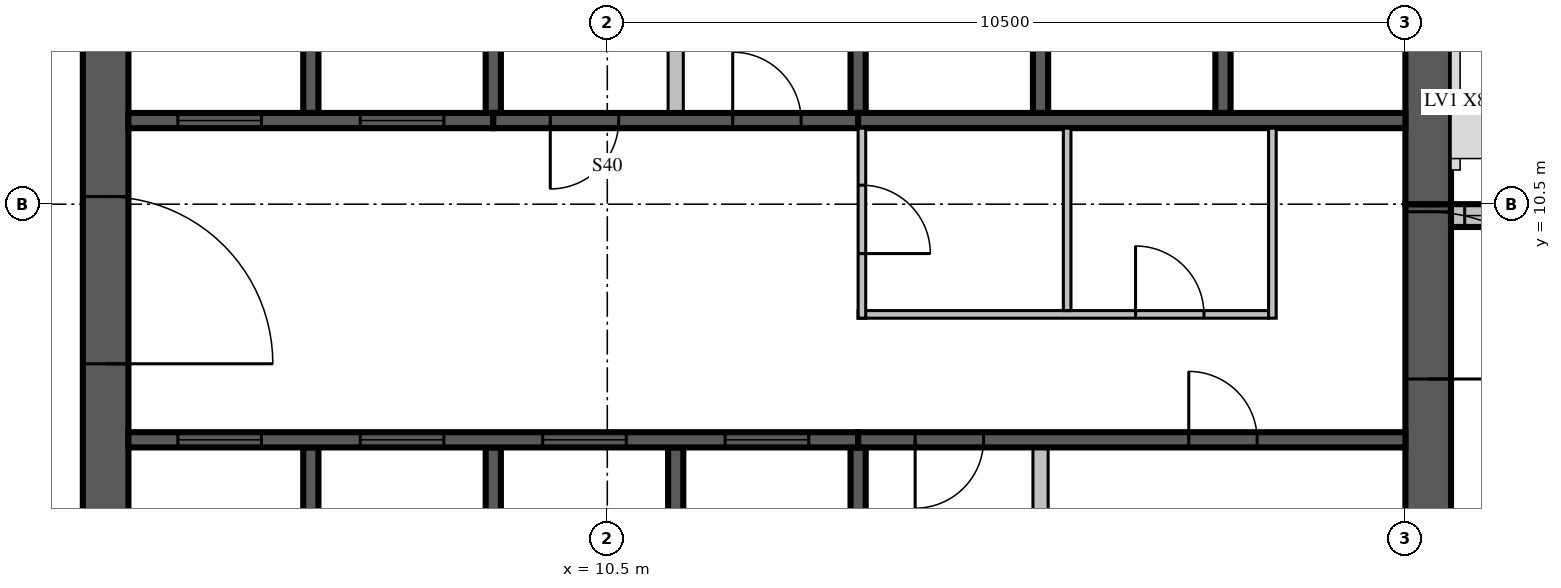
"""IFC4 building model, lengths in metres.
Left out: names, types, materials, properties, quantities, classifications, styles, units other than length and angle.
Written with IfcOpenShell. Run it as: python <this file> out.ifc"""

import sys

from ifc_helpers import new_model, si_unit, direction, frame, frame_2d, origin, place, context, subcontext, project, spatial, rectangle, extrude, source, transform, mapped, element, fill, save


model = new_model("IFC4")
c1 = context("Model", 3, precision=1e-05, world=origin(), true_north=direction((0.0, 1.0)))
c2 = subcontext(c1, "Body", "Model", "MODEL_VIEW")
j1 = project(units=[si_unit("LENGTHUNIT", "METRE"), si_unit("PLANEANGLEUNIT", "RADIAN")], contexts=[c1])
p1 = place(None, origin())
s1 = spatial("IfcSite", under=j1, at=p1, CompositionType="ELEMENT")
p2 = place(p1, origin())
s2 = spatial("IfcBuilding", under=s1, at=p2, CompositionType="ELEMENT")
p3 = place(p2, frame((0.0, 0.0, 319.5)))
s3 = spatial("IfcBuildingStorey", under=s2, at=p3, CompositionType="ELEMENT", Elevation=319.5)
m1 = source(origin(), c2, "Body", "SweptSolid", [
    extrude(rectangle(XDim=17.4, YDim=0.6, at=frame_2d((8.7, 0.0))), origin(), (0.0, 0.0, 1.0), 3.5),
])
p4 = place(p3, frame((3.9, 4.2, 0.0), z_axis=(0.0, 0.0, 1.0), x_axis=(0.0, 1.0, 0.0)))
e1 = element("IfcWall", 1, at=p4, inside=s3, PredefinedType="SHEAR", context=c2, shape_type="MappedRepresentation", body=[
    mapped(m1, transform((0.0, 0.0, 0.0), scale=1.0)),
])
m2 = source(origin(), c2, "Body", "SweptSolid", [
    extrude(rectangle(XDim=2.2, YDim=2.1, at=frame_2d((1.1, 1.05))), frame((0.0, 0.31, 0.0), z_axis=(0.0, -1.0, 0.0), x_axis=(1.0, 0.0, 0.0)), (0.0, 0.0, 1.0), 0.62),
])
p5 = place(p4, frame((4.2, 0.0, 0.0)))
e2 = element("IfcOpeningElement", 2, at=p5, cuts=e1, PredefinedType="OPENING", context=c2, shape_type="MappedRepresentation", body=[
    mapped(m2, transform((0.0, 0.0, 0.0), scale=1.0)),
])
m3 = source(origin(), c2, "Body", "SweptSolid", [
    extrude(rectangle(XDim=6.3, YDim=0.6, at=frame_2d((3.15, 0.0))), origin(), (0.0, 0.0, 1.0), 3.5),
])
p6 = place(p3, frame((21.3, 4.2, 0.0), z_axis=(0.0, 0.0, 1.0), x_axis=(0.0, 1.0, 0.0)))
e3 = element("IfcWall", 3, at=p6, inside=s3, PredefinedType="SHEAR", context=c2, shape_type="MappedRepresentation", body=[
    mapped(m3, transform((0.0, 0.0, 0.0), scale=1.0)),
])
p7 = place(p6, frame((4.0, 0.0, 0.0)))
e4 = element("IfcOpeningElement", 4, at=p7, cuts=e3, PredefinedType="OPENING", context=c2, shape_type="MappedRepresentation", body=[
    mapped(m2, transform((0.0, 0.0, 0.0), scale=1.0)),
])
m4 = source(origin(), c2, "Body", "SweptSolid", [
    extrude(rectangle(XDim=10.5, YDim=0.6, at=frame_2d((5.25, 0.0))), origin(), (0.0, 0.0, 1.0), 3.5),
])
p8 = place(p3, frame((21.3, 10.5, 0.0), z_axis=(0.0, 0.0, 1.0), x_axis=(0.0, 1.0, 0.0)))
e5 = element("IfcWall", 5, at=p8, inside=s3, PredefinedType="SHEAR", context=c2, shape_type="MappedRepresentation", body=[
    mapped(m4, transform((0.0, 0.0, 0.0), scale=1.0)),
])
m5 = source(origin(), c2, "Body", "SweptSolid", [
    extrude(rectangle(XDim=1.2, YDim=2.4, at=frame_2d((0.6, 1.2))), frame((0.0, 0.31, 0.0), z_axis=(0.0, -1.0, 0.0), x_axis=(1.0, 0.0, 0.0)), (0.0, 0.0, 1.0), 0.62),
])
p9 = place(p8, frame((5.7, 0.0, 0.6)))
e6 = element("IfcOpeningElement", 6, at=p9, cuts=e5, PredefinedType="OPENING", context=c2, shape_type="MappedRepresentation", body=[
    mapped(m5, transform((0.0, 0.0, 0.0), scale=1.0)),
])
m6 = source(origin(), c2, "Body", "SweptSolid", [
    extrude(rectangle(XDim=7.45, YDim=0.3, at=frame_2d((3.725, 0.0))), origin(), (0.0, 0.0, 1.0), 3.1),
])
p10 = place(p3, frame((29.05, 10.35, 0.0), z_axis=(0.0, 0.0, 1.0), x_axis=(-1.0, 0.0, 0.0)))
e7 = element("IfcWall", 7, at=p10, inside=s3, PredefinedType="STANDARD", context=c2, shape_type="MappedRepresentation", body=[
    mapped(m6, transform((0.0, 0.0, 0.0), scale=1.0)),
])
m7 = source(origin(), c2, "Body", "SweptSolid", [
    extrude(rectangle(XDim=3.0, YDim=2.0, at=frame_2d((1.5, 1.0))), frame((0.0, 0.16, 0.0), z_axis=(0.0, -1.0, 0.0), x_axis=(1.0, 0.0, 0.0)), (0.0, 0.0, 1.0), 0.32),
])
p11 = place(p10, frame((1.09, 0.0, 0.6)))
e8 = element("IfcOpeningElement", 8, at=p11, cuts=e7, PredefinedType="OPENING", context=c2, shape_type="MappedRepresentation", body=[
    mapped(m7, transform((0.0, 0.0, 0.0), scale=1.0)),
])
m8 = source(origin(), c2, "Body", "SweptSolid", [
    extrude(rectangle(XDim=1.8, YDim=2.0, at=frame_2d((0.9, 1.0))), frame((0.0, 0.16, 0.0), z_axis=(0.0, -1.0, 0.0), x_axis=(1.0, 0.0, 0.0)), (0.0, 0.0, 1.0), 0.32),
])
p12 = place(p10, frame((5.47, 0.0, 0.6)))
e9 = element("IfcOpeningElement", 9, at=p12, cuts=e7, PredefinedType="OPENING", context=c2, shape_type="MappedRepresentation", body=[
    mapped(m8, transform((0.0, 0.0, 0.0), scale=1.0)),
])
m9 = source(origin(), c2, "Body", "SweptSolid", [
    extrude(rectangle(XDim=3.1, YDim=0.2, at=frame_2d((1.55, 0.0))), origin(), (0.0, 0.0, 1.0), 3.5),
])
for number, where, z_axis, x_axis in (
    (10, (6.6, 4.2, 0.0), (0.0, 0.0, 1.0), (0.0, 1.0, 0.0)),
    (11, (9.0, 4.2, 0.0), (0.0, 0.0, 1.0), (0.0, 1.0, 0.0)),
    (12, (11.4, 4.2, 0.0), (0.0, 0.0, 1.0), (0.0, 1.0, 0.0)),
):
    element("IfcWall", number, at=place(p3, frame(where, z_axis=z_axis, x_axis=x_axis)), inside=s3, PredefinedType="SOLIDWALL", context=c2, shape_type="MappedRepresentation", body=[
        mapped(m9, transform((0.0, 0.0, 0.0), scale=1.0)),
    ])
m10 = source(origin(), c2, "Body", "SweptSolid", [
    extrude(rectangle(XDim=3.1, YDim=0.2, at=frame_2d((1.55, 0.0))), origin(), (0.0, 0.0, 1.0), 3.1),
])
p13 = place(p3, frame((13.8, 4.2, 0.0), z_axis=(0.0, 0.0, 1.0), x_axis=(0.0, 1.0, 0.0)))
e13 = element("IfcWall", 13, at=p13, inside=s3, PredefinedType="SOLIDWALL", context=c2, shape_type="MappedRepresentation", body=[
    mapped(m10, transform((0.0, 0.0, 0.0), scale=1.0)),
])
m11 = source(origin(), c2, "Body", "SweptSolid", [
    extrude(rectangle(XDim=3.1, YDim=0.2, at=frame_2d((1.55, 0.0))), origin(), (0.0, 0.0, 1.0), 3.1),
])
p14 = place(p3, frame((16.2, 4.2, 0.0), z_axis=(0.0, 0.0, 1.0), x_axis=(0.0, 1.0, 0.0)))
e14 = element("IfcWall", 14, at=p14, inside=s3, PredefinedType="PARTITIONING", context=c2, shape_type="MappedRepresentation", body=[
    mapped(m11, transform((0.0, 0.0, 0.0), scale=1.0)),
])
m12 = source(origin(), c2, "Body", "SweptSolid", [
    extrude(rectangle(XDim=3.0, YDim=0.2, at=frame_2d((1.5, 0.0))), origin(), (0.0, 0.0, 1.0), 3.5),
])
p15 = place(p3, frame((6.6, 11.7, 0.0), z_axis=(0.0, 0.0, 1.0), x_axis=(0.0, 1.0, 0.0)))
e15 = element("IfcWall", 15, at=p15, inside=s3, PredefinedType="SOLIDWALL", context=c2, shape_type="MappedRepresentation", body=[
    mapped(m12, transform((0.0, 0.0, 0.0), scale=1.0)),
])
m13 = source(origin(), c2, "Body", "SweptSolid", [
    extrude(rectangle(XDim=3.0, YDim=0.2, at=frame_2d((1.5, 0.0))), origin(), (0.0, 0.0, 1.0), 3.1),
])
for number, where, z_axis, x_axis in (
    (16, (9.0, 11.7, 0.0), (0.0, 0.0, 1.0), (0.0, 1.0, 0.0)),
    (17, (13.8, 11.7, 0.0), (0.0, 0.0, 1.0), (0.0, 1.0, 0.0)),
):
    element("IfcWall", number, at=place(p3, frame(where, z_axis=z_axis, x_axis=x_axis)), inside=s3, PredefinedType="SOLIDWALL", context=c2, shape_type="MappedRepresentation", body=[
        mapped(m13, transform((0.0, 0.0, 0.0), scale=1.0)),
    ])
for number, where, z_axis, x_axis in (
    (18, (16.2, 11.7, 0.0), (0.0, 0.0, 1.0), (0.0, 1.0, 0.0)),
    (19, (18.6, 11.7, 0.0), (0.0, 0.0, 1.0), (0.0, 1.0, 0.0)),
):
    element("IfcWall", number, at=place(p3, frame(where, z_axis=z_axis, x_axis=x_axis)), inside=s3, PredefinedType="SOLIDWALL", context=c2, shape_type="MappedRepresentation", body=[
        mapped(m12, transform((0.0, 0.0, 0.0), scale=1.0)),
    ])
m14 = source(origin(), c2, "Body", "SweptSolid", [
    extrude(rectangle(XDim=3.0, YDim=0.2, at=frame_2d((1.5, 0.0))), origin(), (0.0, 0.0, 1.0), 3.1),
])
p16 = place(p3, frame((11.4, 11.7, 0.0), z_axis=(0.0, 0.0, 1.0), x_axis=(0.0, 1.0, 0.0)))
e20 = element("IfcWall", 20, at=p16, inside=s3, PredefinedType="PARTITIONING", context=c2, shape_type="MappedRepresentation", body=[
    mapped(m14, transform((0.0, 0.0, 0.0), scale=1.0)),
])
m15 = source(origin(), c2, "Body", "SweptSolid", [
    extrude(rectangle(XDim=9.6, YDim=0.2, at=frame_2d((4.8, 0.0))), origin(), (0.0, 0.0, 1.0), 3.5),
])
p17 = place(p3, frame((4.2, 7.4, 0.0), z_axis=(0.0, 0.0, 1.0), x_axis=(1.0, 0.0, 0.0)))
e21 = element("IfcWall", 21, at=p17, inside=s3, PredefinedType="SOLIDWALL", context=c2, shape_type="MappedRepresentation", body=[
    mapped(m15, transform((0.0, 0.0, 0.0), scale=1.0)),
])
m16 = source(origin(), c2, "Body", "SweptSolid", [
    extrude(rectangle(XDim=1.1, YDim=2.1, at=frame_2d((0.55, 1.05))), frame((0.0, 0.11, 0.0), z_axis=(0.0, -1.0, 0.0), x_axis=(1.0, 0.0, 0.0)), (0.0, 0.0, 1.0), 0.22),
])
p18 = place(p17, frame((0.65, 0.0, 0.0)))
e22 = element("IfcOpeningElement", 22, at=p18, cuts=e21, PredefinedType="OPENING", context=c2, shape_type="MappedRepresentation", body=[
    mapped(m16, transform((0.0, 0.0, 0.0), scale=1.0)),
])
p19 = place(p17, frame((3.05, 0.0, 0.0)))
e23 = element("IfcOpeningElement", 23, at=p19, cuts=e21, PredefinedType="OPENING", context=c2, shape_type="MappedRepresentation", body=[
    mapped(m16, transform((0.0, 0.0, 0.0), scale=1.0)),
])
p20 = place(p17, frame((5.45, 0.0, 0.0)))
e24 = element("IfcOpeningElement", 24, at=p20, cuts=e21, PredefinedType="OPENING", context=c2, shape_type="MappedRepresentation", body=[
    mapped(m16, transform((0.0, 0.0, 0.0), scale=1.0)),
])
p21 = place(p17, frame((7.85, 0.0, 0.0)))
e25 = element("IfcOpeningElement", 25, at=p21, cuts=e21, PredefinedType="OPENING", context=c2, shape_type="MappedRepresentation", body=[
    mapped(m16, transform((0.0, 0.0, 0.0), scale=1.0)),
])
m17 = source(origin(), c2, "Body", "SweptSolid", [
    extrude(rectangle(XDim=7.2, YDim=0.2, at=frame_2d((3.6, 0.0))), origin(), (0.0, 0.0, 1.0), 3.1),
])
p22 = place(p3, frame((13.8, 7.4, 0.0), z_axis=(0.0, 0.0, 1.0), x_axis=(1.0, 0.0, 0.0)))
e26 = element("IfcWall", 26, at=p22, inside=s3, PredefinedType="SOLIDWALL", context=c2, shape_type="MappedRepresentation", body=[
    mapped(m17, transform((0.0, 0.0, 0.0), scale=1.0)),
])
m18 = source(origin(), c2, "Body", "SweptSolid", [
    extrude(rectangle(XDim=0.9, YDim=2.1, at=frame_2d((0.45, 1.05))), frame((0.0, 0.11, 0.0), z_axis=(0.0, -1.0, 0.0), x_axis=(1.0, 0.0, 0.0)), (0.0, 0.0, 1.0), 0.22),
])
p23 = place(p22, frame((0.75, 0.0, 0.0)))
e27 = element("IfcOpeningElement", 27, at=p23, cuts=e26, PredefinedType="OPENING", context=c2, shape_type="MappedRepresentation", body=[
    mapped(m18, transform((0.0, 0.0, 0.0), scale=1.0)),
])
p24 = place(p22, frame((4.35, 0.0, 0.0)))
e28 = element("IfcOpeningElement", 28, at=p24, cuts=e26, PredefinedType="OPENING", context=c2, shape_type="MappedRepresentation", body=[
    mapped(m18, transform((0.0, 0.0, 0.0), scale=1.0)),
])
m19 = source(origin(), c2, "Body", "SweptSolid", [
    extrude(rectangle(XDim=4.8, YDim=0.2, at=frame_2d((2.4, 0.0))), origin(), (0.0, 0.0, 1.0), 3.5),
])
p25 = place(p3, frame((4.2, 11.6, 0.0), z_axis=(0.0, 0.0, 1.0), x_axis=(1.0, 0.0, 0.0)))
e29 = element("IfcWall", 29, at=p25, inside=s3, PredefinedType="SOLIDWALL", context=c2, shape_type="MappedRepresentation", body=[
    mapped(m19, transform((0.0, 0.0, 0.0), scale=1.0)),
])
p26 = place(p25, frame((0.65, 0.0, 0.0)))
e30 = element("IfcOpeningElement", 30, at=p26, cuts=e29, PredefinedType="OPENING", context=c2, shape_type="MappedRepresentation", body=[
    mapped(m16, transform((0.0, 0.0, 0.0), scale=1.0)),
])
p27 = place(p25, frame((3.05, 0.0, 0.0)))
e31 = element("IfcOpeningElement", 31, at=p27, cuts=e29, PredefinedType="OPENING", context=c2, shape_type="MappedRepresentation", body=[
    mapped(m16, transform((0.0, 0.0, 0.0), scale=1.0)),
])
m20 = source(origin(), c2, "Body", "SweptSolid", [
    extrude(rectangle(XDim=4.8, YDim=0.2, at=frame_2d((2.4, 0.0))), origin(), (0.0, 0.0, 1.0), 3.1),
])
p28 = place(p3, frame((9.0, 11.6, 0.0), z_axis=(0.0, 0.0, 1.0), x_axis=(1.0, 0.0, 0.0)))
e32 = element("IfcWall", 32, at=p28, inside=s3, PredefinedType="SOLIDWALL", context=c2, shape_type="MappedRepresentation", body=[
    mapped(m20, transform((0.0, 0.0, 0.0), scale=1.0)),
])
p29 = place(p28, frame((0.75, 0.0, 0.0)))
e33 = element("IfcOpeningElement", 33, at=p29, cuts=e32, PredefinedType="OPENING", context=c2, shape_type="MappedRepresentation", body=[
    mapped(m18, transform((0.0, 0.0, 0.0), scale=1.0)),
])
p30 = place(p28, frame((3.15, 0.0, 0.0)))
e34 = element("IfcOpeningElement", 34, at=p30, cuts=e32, PredefinedType="OPENING", context=c2, shape_type="MappedRepresentation", body=[
    mapped(m18, transform((0.0, 0.0, 0.0), scale=1.0)),
])
m21 = source(origin(), c2, "Body", "SweptSolid", [
    extrude(rectangle(XDim=7.2, YDim=0.2, at=frame_2d((3.6, 0.0))), origin(), (0.0, 0.0, 1.0), 3.5),
])
p31 = place(p3, frame((13.8, 11.6, 0.0), z_axis=(0.0, 0.0, 1.0), x_axis=(1.0, 0.0, 0.0)))
e35 = element("IfcWall", 35, at=p31, inside=s3, PredefinedType="SOLIDWALL", context=c2, shape_type="MappedRepresentation", body=[
    mapped(m21, transform((0.0, 0.0, 0.0), scale=1.0)),
])
m22 = source(origin(), c2, "Body", "SweptSolid", [
    extrude(rectangle(XDim=5.4, YDim=0.1, at=frame_2d((2.7, 0.0))), origin(), (0.0, 0.0, 1.0), 3.1),
])
p32 = place(p3, frame((13.8, 9.05, 0.0), z_axis=(0.0, 0.0, 1.0), x_axis=(1.0, 0.0, 0.0)))
e36 = element("IfcWall", 36, at=p32, inside=s3, PredefinedType="PARTITIONING", context=c2, shape_type="MappedRepresentation", body=[
    mapped(m22, transform((0.0, 0.0, 0.0), scale=1.0)),
])
m23 = source(origin(), c2, "Body", "SweptSolid", [
    extrude(rectangle(XDim=0.9, YDim=2.1, at=frame_2d((0.45, 1.05))), frame((0.0, 0.06, 0.0), z_axis=(0.0, -1.0, 0.0), x_axis=(1.0, 0.0, 0.0)), (0.0, 0.0, 1.0), 0.12),
])
p33 = place(p32, frame((3.65, 0.0, 0.0)))
e37 = element("IfcOpeningElement", 37, at=p33, cuts=e36, PredefinedType="OPENING", context=c2, shape_type="MappedRepresentation", body=[
    mapped(m23, transform((0.0, 0.0, 0.0), scale=1.0)),
])
m24 = source(origin(), c2, "Body", "SweptSolid", [
    extrude(rectangle(XDim=2.5, YDim=0.1, at=frame_2d((1.25, 0.0))), origin(), (0.0, 0.0, 1.0), 3.1),
])
p34 = place(p3, frame((13.85, 9.0, 0.0), z_axis=(0.0, 0.0, 1.0), x_axis=(0.0, 1.0, 0.0)))
e38 = element("IfcWall", 38, at=p34, inside=s3, PredefinedType="PARTITIONING", context=c2, shape_type="MappedRepresentation", body=[
    mapped(m24, transform((0.0, 0.0, 0.0), scale=1.0)),
])
p35 = place(p34, frame((0.85, 0.0, 0.0)))
e39 = element("IfcOpeningElement", 39, at=p35, cuts=e38, PredefinedType="OPENING", context=c2, shape_type="MappedRepresentation", body=[
    mapped(m23, transform((0.0, 0.0, 0.0), scale=1.0)),
])
m25 = source(origin(), c2, "Body", "SweptSolid", [
    extrude(rectangle(XDim=2.4, YDim=0.1, at=frame_2d((1.2, 0.0))), origin(), (0.0, 0.0, 1.0), 3.1),
])
p36 = place(p3, frame((16.55, 9.1, 0.0), z_axis=(0.0, 0.0, 1.0), x_axis=(0.0, 1.0, 0.0)))
e40 = element("IfcWall", 40, at=p36, inside=s3, PredefinedType="PARTITIONING", context=c2, shape_type="MappedRepresentation", body=[
    mapped(m25, transform((0.0, 0.0, 0.0), scale=1.0)),
])
p37 = place(p3, frame((19.25, 9.0, 0.0), z_axis=(0.0, 0.0, 1.0), x_axis=(0.0, 1.0, 0.0)))
e41 = element("IfcWall", 41, at=p37, inside=s3, PredefinedType="PARTITIONING", context=c2, shape_type="MappedRepresentation", body=[
    mapped(m24, transform((0.0, 0.0, 0.0), scale=1.0)),
])
m26 = source(origin(), c2, "Body", "SweptSolid", [
    extrude(rectangle(XDim=1.8, YDim=2.0, at=frame_2d((0.9, 1.0))), frame((0.0, 0.03, 0.0), z_axis=(0.0, -1.0, 0.0), x_axis=(1.0, 0.0, 0.0)), (0.0, 0.0, 1.0), 0.06),
])
p38 = place(p12, origin())
e42 = element("IfcWindow", 42, at=p38, inside=s3, PartitioningType="SINGLE_PANEL", PredefinedType="WINDOW", context=c2, shape_type="MappedRepresentation", body=[
    mapped(m26, transform((0.0, 0.0, 0.0), scale=1.0)),
])
fill(e9, e42)
m27 = source(origin(), c2, "Body", "SweptSolid", [
    extrude(rectangle(XDim=1.1, YDim=2.1, at=frame_2d((0.55, 1.05))), frame((0.0, 0.025, 0.0), z_axis=(0.0, -1.0, 0.0), x_axis=(1.0, 0.0, 0.0)), (0.0, 0.0, 1.0), 0.05),
])
p39 = place(p18, origin())
e43 = element("IfcDoor", 43, at=p39, inside=s3, OperationType="SLIDING_TO_LEFT", PredefinedType="DOOR", context=c2, shape_type="MappedRepresentation", body=[
    mapped(m27, transform((0.0, 0.0, 0.0), scale=1.0)),
])
fill(e22, e43)
p40 = place(p19, origin())
e44 = element("IfcDoor", 44, at=p40, inside=s3, OperationType="SLIDING_TO_LEFT", PredefinedType="DOOR", context=c2, shape_type="MappedRepresentation", body=[
    mapped(m27, transform((0.0, 0.0, 0.0), scale=1.0)),
])
fill(e23, e44)
p41 = place(p20, origin())
e45 = element("IfcDoor", 45, at=p41, inside=s3, OperationType="SLIDING_TO_LEFT", PredefinedType="DOOR", context=c2, shape_type="MappedRepresentation", body=[
    mapped(m27, transform((0.0, 0.0, 0.0), scale=1.0)),
])
fill(e24, e45)
p42 = place(p21, origin())
e46 = element("IfcDoor", 46, at=p42, inside=s3, OperationType="SLIDING_TO_LEFT", PredefinedType="DOOR", context=c2, shape_type="MappedRepresentation", body=[
    mapped(m27, transform((0.0, 0.0, 0.0), scale=1.0)),
])
fill(e25, e46)
m28 = source(origin(), c2, "Body", "SweptSolid", [
    extrude(rectangle(XDim=0.9, YDim=2.1, at=frame_2d((0.45, 1.05))), frame((0.0, 0.025, 0.0), z_axis=(0.0, -1.0, 0.0), x_axis=(1.0, 0.0, 0.0)), (0.0, 0.0, 1.0), 0.05),
])
p43 = place(p23, origin())
e47 = element("IfcDoor", 47, at=p43, inside=s3, OperationType="SINGLE_SWING_RIGHT", PredefinedType="DOOR", context=c2, shape_type="MappedRepresentation", body=[
    mapped(m28, transform((0.0, 0.0, 0.0), scale=1.0)),
])
fill(e27, e47)
p44 = place(p24, origin())
e48 = element("IfcDoor", 48, at=p44, inside=s3, OperationType="SINGLE_SWING_LEFT", PredefinedType="DOOR", context=c2, shape_type="MappedRepresentation", body=[
    mapped(m28, transform((0.0, 0.0, 0.0), scale=1.0)),
])
fill(e28, e48)
p45 = place(p26, origin())
e49 = element("IfcDoor", 49, at=p45, inside=s3, OperationType="SLIDING_TO_LEFT", PredefinedType="DOOR", context=c2, shape_type="MappedRepresentation", body=[
    mapped(m27, transform((0.0, 0.0, 0.0), scale=1.0)),
])
fill(e30, e49)
p46 = place(p27, origin())
e50 = element("IfcDoor", 50, at=p46, inside=s3, OperationType="SLIDING_TO_LEFT", PredefinedType="DOOR", context=c2, shape_type="MappedRepresentation", body=[
    mapped(m27, transform((0.0, 0.0, 0.0), scale=1.0)),
])
fill(e31, e50)
p47 = place(p29, origin())
e51 = element("IfcDoor", 51, at=p47, inside=s3, OperationType="SINGLE_SWING_RIGHT", PredefinedType="DOOR", context=c2, shape_type="MappedRepresentation", body=[
    mapped(m28, transform((0.0, 0.0, 0.0), scale=1.0)),
])
fill(e33, e51)
p48 = place(p30, origin())
e52 = element("IfcDoor", 52, at=p48, inside=s3, OperationType="SINGLE_SWING_LEFT", PredefinedType="DOOR", context=c2, shape_type="MappedRepresentation", body=[
    mapped(m28, transform((0.0, 0.0, 0.0), scale=1.0)),
])
fill(e34, e52)
p49 = place(p33, origin())
e53 = element("IfcDoor", 53, at=p49, inside=s3, OperationType="SINGLE_SWING_LEFT", PredefinedType="DOOR", context=c2, shape_type="MappedRepresentation", body=[
    mapped(m28, transform((0.0, 0.0, 0.0), scale=1.0)),
])
fill(e37, e53)
p50 = place(p35, origin())
e54 = element("IfcDoor", 54, at=p50, inside=s3, OperationType="SINGLE_SWING_RIGHT", PredefinedType="DOOR", context=c2, shape_type="MappedRepresentation", body=[
    mapped(m28, transform((0.0, 0.0, 0.0), scale=1.0)),
])
fill(e39, e54)
m29 = source(origin(), c2, "Body", "SweptSolid", [
    extrude(rectangle(XDim=2.2, YDim=2.1, at=frame_2d((1.1, 1.05))), frame((0.0, 0.025, 0.0), z_axis=(0.0, -1.0, 0.0), x_axis=(1.0, 0.0, 0.0)), (0.0, 0.0, 1.0), 0.05),
])
p51 = place(p7, origin())
e55 = element("IfcDoor", 55, at=p51, inside=s3, OperationType="DOUBLE_DOOR_SINGLE_SWING", PredefinedType="DOOR", context=c2, shape_type="MappedRepresentation", body=[
    mapped(m29, transform((0.0, 0.0, 0.0), scale=1.0)),
])
fill(e4, e55)
p52 = place(p5, origin())
e56 = element("IfcDoor", 56, at=p52, inside=s3, OperationType="DOUBLE_DOOR_SINGLE_SWING", PredefinedType="DOOR", context=c2, shape_type="MappedRepresentation", body=[
    mapped(m29, transform((0.0, 0.0, 0.0), scale=1.0)),
])
fill(e2, e56)
save(model, sys.argv[1])
